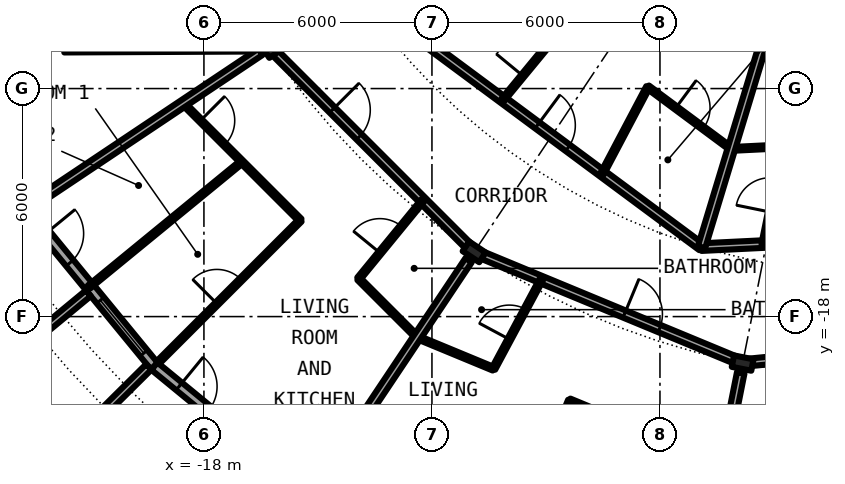
"""IFC4 building model, lengths in metres.
Left out: names, types, materials, properties, quantities, classifications, styles, units other than length and angle.
Written with IfcOpenShell. Run it as: python <this file> out.ifc"""

import sys

from ifc_helpers import new_model, si_unit, direction, frame, frame_2d, origin, origin_2d, place, context, subcontext, project, spatial, rectangle, circle, i_section, extrude, element, fill, save


model = new_model("IFC4")
c1 = context("Model", 3, precision=1e-05, world=origin(), true_north=direction((0.0, 1.0)))
c2 = subcontext(c1, "Body", "Model", "MODEL_VIEW")
j1 = project(units=[si_unit("LENGTHUNIT", "METRE"), si_unit("PLANEANGLEUNIT", "RADIAN")], contexts=[c1])
p1 = place(None, origin())
s1 = spatial("IfcSite", under=j1, at=p1, CompositionType="ELEMENT")
p2 = place(p1, origin())
s2 = spatial("IfcBuilding", under=s1, at=p2, CompositionType="ELEMENT")
p3 = place(p2, frame((0.0, 0.0, 63.6)))
s3 = spatial("IfcBuildingStorey", under=s2, at=p3, CompositionType="ELEMENT", Elevation=63.6)
for number, where, z_axis, x_axis in (
    (1, (-16.297, -10.889, 0.0), (0.0, 0.0, 1.0), (-0.831, -0.556, 0.0)),
    (2, (-10.889, -16.297, 0.0), (0.0, 0.0, 1.0), (-0.556, -0.831, 0.0)),
    (3, (-3.824, -19.223, 0.0), (0.0, 0.0, 1.0), (-0.195, -0.981, 0.0)),
):
    element("IfcColumn", number, at=place(p3, frame(where, z_axis=z_axis, x_axis=x_axis)), inside=s3, PredefinedType="COLUMN", context=c2, shape_type="SweptSolid", body=[
        extrude(i_section(OverallWidth=0.306, OverallDepth=0.524, WebThickness=0.021, FlangeThickness=0.04, FilletRadius=0.027, at=origin_2d()), origin(), (0.0, 0.0, 1.0), 3.05),
    ])
p4 = place(p3, frame((-22.699, -15.167, 0.0), z_axis=(0.0, 0.0, 1.0), x_axis=(0.634382322723, -0.773019449054, 0.0)))
e4 = element("IfcWall", 4, at=p4, inside=s3, PredefinedType="SOLIDWALL", context=c2, shape_type="SweptSolid", body=[
    extrude(rectangle(XDim=5.352, YDim=0.25, at=frame_2d((2.676, 0.0))), origin(), (0.0, 0.0, 1.0), 2.7),
])
p5 = place(p4, frame((0.841, 0.0, 0.0)))
e5 = element("IfcOpeningElement", 5, at=p5, cuts=e4, PredefinedType="OPENING", context=c2, shape_type="SweptSolid", body=[
    extrude(rectangle(XDim=1.0, YDim=2.2, at=frame_2d((0.5, 1.1))), frame((0.0, 0.135, 0.0), z_axis=(0.0, -1.0, 0.0), x_axis=(1.0, 0.0, 0.0)), (0.0, 0.0, 1.0), 0.27),
])
p6 = place(p4, frame((3.111, 0.0, 0.3)))
e6 = element("IfcOpeningElement", 6, at=p6, cuts=e4, PredefinedType="OPENING", context=c2, shape_type="SweptSolid", body=[
    extrude(rectangle(XDim=1.8, YDim=2.1, at=frame_2d((0.9, 1.05))), frame((0.0, 0.135, 0.0), z_axis=(0.0, -1.0, 0.0), x_axis=(1.0, 0.0, 0.0)), (0.0, 0.0, 1.0), 0.27),
])
p7 = place(p3, frame((-23.503, -19.282, -0.03), z_axis=(0.0, 0.0, 1.0), x_axis=(0.671506829416, -0.740998365753, 0.0)))
e7 = element("IfcWall", 7, at=p7, inside=s3, PredefinedType="SOLIDWALL", context=c2, shape_type="SweptSolid", body=[
    extrude(rectangle(XDim=2.993, YDim=0.2, at=frame_2d((1.497, 0.0))), origin(), (0.0, 0.0, 1.0), 2.73),
])
p8 = place(p7, frame((0.457, 0.0, 0.33)))
e8 = element("IfcOpeningElement", 8, at=p8, cuts=e7, PredefinedType="OPENING", context=c2, shape_type="SweptSolid", body=[
    extrude(circle(Radius=1.04, at=frame_2d((1.04, 1.04))), frame((0.0, 0.11, 0.0), z_axis=(0.0, -1.0, 0.0), x_axis=(1.0, 0.0, 0.0)), (0.0, 0.0, 1.0), 0.22),
])
p9 = place(p3, frame((-21.041, -17.384, -0.03), z_axis=(0.0, 0.0, 1.0), x_axis=(-0.770784861449, -0.63709551667, 0.0)))
e9 = element("IfcWall", 9, at=p9, inside=s3, PredefinedType="SOLIDWALL", context=c2, shape_type="SweptSolid", body=[
    extrude(rectangle(XDim=3.006, YDim=0.2, at=frame_2d((1.503, 0.0))), origin(), (0.0, 0.0, 1.0), 2.73),
])
p10 = place(p3, frame((-19.45, -19.323, -0.03), z_axis=(0.0, 0.0, 1.0), x_axis=(-0.709727076896, -0.704476739375, 0.0)))
e10 = element("IfcWall", 10, at=p10, inside=s3, PredefinedType="SOLIDWALL", context=c2, shape_type="SweptSolid", body=[
    extrude(rectangle(XDim=2.883, YDim=0.2, at=frame_2d((1.441, 0.0))), origin(), (0.0, 0.0, 1.0), 2.73),
])
p11 = place(p3, frame((-19.304, -19.304, 0.0), z_axis=(0.0, 0.0, 1.0), x_axis=(0.773019449054, -0.634382322723, 0.0)))
e11 = element("IfcWall", 11, at=p11, inside=s3, PredefinedType="SOLIDWALL", context=c2, shape_type="SweptSolid", body=[
    extrude(rectangle(XDim=5.352, YDim=0.25, at=frame_2d((2.676, 0.0))), origin(), (0.0, 0.0, 1.0), 2.7),
])
p12 = place(p11, frame((0.841, 0.0, 0.0)))
e12 = element("IfcOpeningElement", 12, at=p12, cuts=e11, PredefinedType="OPENING", context=c2, shape_type="SweptSolid", body=[
    extrude(rectangle(XDim=1.0, YDim=2.2, at=frame_2d((0.5, 1.1))), frame((0.0, 0.135, 0.0), z_axis=(0.0, -1.0, 0.0), x_axis=(1.0, 0.0, 0.0)), (0.0, 0.0, 1.0), 0.27),
])
p13 = place(p11, frame((3.111, 0.0, 0.3)))
e13 = element("IfcOpeningElement", 13, at=p13, cuts=e11, PredefinedType="OPENING", context=c2, shape_type="SweptSolid", body=[
    extrude(rectangle(XDim=1.8, YDim=2.1, at=frame_2d((0.9, 1.05))), frame((0.0, 0.135, 0.0), z_axis=(0.0, -1.0, 0.0), x_axis=(1.0, 0.0, 0.0)), (0.0, 0.0, 1.0), 0.27),
])
p14 = place(p3, frame((-18.545, -12.386, 0.0), z_axis=(0.0, 0.0, 1.0), x_axis=(0.707106781187, -0.707106781187, 0.0)))
e14 = element("IfcWall", 14, at=p14, inside=s3, PredefinedType="PARTITIONING", context=c2, shape_type="SweptSolid", body=[
    extrude(rectangle(XDim=4.351, YDim=0.1, at=frame_2d((2.176, 0.0))), origin(), (0.0, 0.0, 1.0), 2.7),
])
p15 = place(p14, frame((0.644, 0.0, 0.0)))
e15 = element("IfcOpeningElement", 15, at=p15, cuts=e14, PredefinedType="OPENING", context=c2, shape_type="SweptSolid", body=[
    extrude(rectangle(XDim=0.9, YDim=2.3, at=frame_2d((0.45, 1.15))), frame((0.0, 0.06, 0.0), z_axis=(0.0, -1.0, 0.0), x_axis=(1.0, 0.0, 0.0)), (0.0, 0.0, 1.0), 0.12),
])
p16 = place(p3, frame((-13.927, -17.004, 0.0), z_axis=(0.0, 0.0, 1.0), x_axis=(0.707106781187, -0.707106781187, 0.0)))
e16 = element("IfcWall", 16, at=p16, inside=s3, PredefinedType="PARTITIONING", context=c2, shape_type="SweptSolid", body=[
    extrude(rectangle(XDim=2.175, YDim=0.1, at=frame_2d((1.088, 0.0))), origin(), (0.0, 0.0, 1.0), 2.7),
])
p17 = place(p3, frame((-12.392, -18.541, 0.0), z_axis=(0.0, 0.0, 1.0), x_axis=(0.923901895183, -0.382629439638, 0.0)))
e17 = element("IfcWall", 17, at=p17, inside=s3, PredefinedType="PARTITIONING", context=c2, shape_type="SweptSolid", body=[
    extrude(rectangle(XDim=2.175, YDim=0.1, at=frame_2d((1.087, 0.0))), origin(), (0.0, 0.0, 1.0), 2.7),
])
p18 = place(p3, frame((-8.376, -20.204, 0.0), z_axis=(0.0, 0.0, 1.0), x_axis=(0.92378218199, -0.382918372814, 0.0)))
e18 = element("IfcWall", 18, at=p18, inside=s3, PredefinedType="PARTITIONING", context=c2, shape_type="SweptSolid", body=[
    extrude(rectangle(XDim=4.364, YDim=0.1, at=frame_2d((2.182, 0.0))), origin(), (0.0, 0.0, 1.0), 2.7),
])
p19 = place(p18, frame((2.823, 0.0, 0.0)))
e19 = element("IfcOpeningElement", 19, at=p19, cuts=e18, PredefinedType="OPENING", context=c2, shape_type="SweptSolid", body=[
    extrude(rectangle(XDim=0.9, YDim=2.3, at=frame_2d((0.45, 1.15))), frame((0.0, 0.06, 0.0), z_axis=(0.0, -1.0, 0.0), x_axis=(1.0, 0.0, 0.0)), (0.0, 0.0, 1.0), 0.12),
])
p20 = place(p3, frame((-16.186, -11.0, 0.0), z_axis=(0.0, 0.0, 1.0), x_axis=(0.707106781187, -0.707106781187, 0.0)))
e20 = element("IfcWall", 20, at=p20, inside=s3, PredefinedType="PARTITIONING", context=c2, shape_type="SweptSolid", body=[
    extrude(rectangle(XDim=7.334, YDim=0.2, at=frame_2d((3.667, 0.0))), origin(), (0.0, 0.0, 1.0), 2.38),
])
p21 = place(p20, frame((2.211, 0.0, 0.0)))
e21 = element("IfcOpeningElement", 21, at=p21, cuts=e20, PredefinedType="OPENING", context=c2, shape_type="SweptSolid", body=[
    extrude(rectangle(XDim=1.0, YDim=2.3, at=frame_2d((0.5, 1.15))), frame((0.0, 0.11, 0.0), z_axis=(0.0, -1.0, 0.0), x_axis=(1.0, 0.0, 0.0)), (0.0, 0.0, 1.0), 0.22),
])
p22 = place(p3, frame((-10.745, -16.356, 0.0), z_axis=(0.0, 0.0, 1.0), x_axis=(0.923881347896, -0.382679049609, 0.0)))
e22 = element("IfcWall", 22, at=p22, inside=s3, PredefinedType="PARTITIONING", context=c2, shape_type="SweptSolid", body=[
    extrude(rectangle(XDim=7.335, YDim=0.2, at=frame_2d((3.668, 0.0))), origin(), (0.0, 0.0, 1.0), 2.38),
])
p23 = place(p22, frame((4.124, 0.0, 0.0)))
e23 = element("IfcOpeningElement", 23, at=p23, cuts=e22, PredefinedType="OPENING", context=c2, shape_type="SweptSolid", body=[
    extrude(rectangle(XDim=1.0, YDim=2.3, at=frame_2d((0.5, 1.15))), frame((0.0, 0.11, 0.0), z_axis=(0.0, -1.0, 0.0), x_axis=(1.0, 0.0, 0.0)), (0.0, 0.0, 1.0), 0.22),
])
p24 = place(p3, frame((-3.665, -19.207, 0.0), z_axis=(0.0, 0.0, 1.0), x_axis=(0.995190249661, 0.097961048277, 0.0)))
e24 = element("IfcWall", 24, at=p24, inside=s3, PredefinedType="PARTITIONING", context=c2, shape_type="SweptSolid", body=[
    extrude(rectangle(XDim=11.22, YDim=0.2, at=frame_2d((5.61, 0.0))), origin(), (0.0, 0.0, 1.0), 2.38),
])
p25 = place(p24, frame((4.08, 0.0, 0.0)))
e25 = element("IfcOpeningElement", 25, at=p25, cuts=e24, PredefinedType="OPENING", context=c2, shape_type="SweptSolid", body=[
    extrude(rectangle(XDim=1.0, YDim=2.3, at=frame_2d((0.5, 1.15))), frame((0.0, 0.11, 0.0), z_axis=(0.0, -1.0, 0.0), x_axis=(1.0, 0.0, 0.0)), (0.0, 0.0, 1.0), 0.22),
])
p26 = place(p3, frame((-12.745, -10.358, 0.0), z_axis=(0.0, 0.0, 1.0), x_axis=(0.803191461888, -0.595720971219, 0.0)))
e26 = element("IfcWall", 26, at=p26, inside=s3, PredefinedType="PARTITIONING", context=c2, shape_type="SweptSolid", body=[
    extrude(rectangle(XDim=9.76, YDim=0.2, at=frame_2d((4.88, 0.0))), origin(), (0.0, 0.0, 1.0), 2.7),
])
p27 = place(p26, frame((4.38, 0.0, 0.0)))
e27 = element("IfcOpeningElement", 27, at=p27, cuts=e26, PredefinedType="OPENING", context=c2, shape_type="SweptSolid", body=[
    extrude(rectangle(XDim=1.0, YDim=2.3, at=frame_2d((0.5, 1.15))), frame((0.0, 0.11, 0.0), z_axis=(0.0, -1.0, 0.0), x_axis=(1.0, 0.0, 0.0)), (0.0, 0.0, 1.0), 0.22),
])
p28 = place(p3, frame((-4.909, -16.172, 0.0), z_axis=(0.0, 0.0, 1.0), x_axis=(0.99879913765, 0.048992679355, 0.0)))
e28 = element("IfcWall", 28, at=p28, inside=s3, PredefinedType="PARTITIONING", context=c2, shape_type="SweptSolid", body=[
    extrude(rectangle(XDim=11.392, YDim=0.2, at=frame_2d((5.696, 0.0))), origin(), (0.0, 0.0, 1.0), 2.7),
])
p29 = place(p28, frame((6.011, 0.0, 0.0)))
e29 = element("IfcOpeningElement", 29, at=p29, cuts=e28, PredefinedType="OPENING", context=c2, shape_type="SweptSolid", body=[
    extrude(rectangle(XDim=1.0, YDim=2.3, at=frame_2d((0.5, 1.15))), frame((0.0, 0.11, 0.0), z_axis=(0.0, -1.0, 0.0), x_axis=(1.0, 0.0, 0.0)), (0.0, 0.0, 1.0), 0.22),
])
p30 = place(p3, frame((-6.319, -11.96, 0.0), z_axis=(0.0, 0.0, 1.0), x_axis=(0.803128348509, -0.595806055542, 0.0)))
e30 = element("IfcWall", 30, at=p30, inside=s3, PredefinedType="PARTITIONING", context=c2, shape_type="SweptSolid", body=[
    extrude(rectangle(XDim=2.734, YDim=0.1, at=frame_2d((1.367, 0.0))), origin(), (0.0, 0.0, 1.0), 2.7),
])
p31 = place(p30, frame((0.918, 0.0, 0.0)))
e31 = element("IfcOpeningElement", 31, at=p31, cuts=e30, PredefinedType="OPENING", context=c2, shape_type="SweptSolid", body=[
    extrude(rectangle(XDim=0.9, YDim=2.3, at=frame_2d((0.45, 1.15))), frame((0.0, 0.06, 0.0), z_axis=(0.0, -1.0, 0.0), x_axis=(1.0, 0.0, 0.0)), (0.0, 0.0, 1.0), 0.12),
])
p32 = place(p3, frame((-4.132, -13.589, 0.0), z_axis=(0.0, 0.0, 1.0), x_axis=(0.998789681748, 0.049185075323, 0.0)))
e32 = element("IfcWall", 32, at=p32, inside=s3, PredefinedType="PARTITIONING", context=c2, shape_type="SweptSolid", body=[
    extrude(rectangle(XDim=4.11, YDim=0.1, at=frame_2d((2.055, 0.0))), origin(), (0.0, 0.0, 1.0), 2.7),
])
p33 = place(p3, frame((-21.675, -10.95, 0.0), z_axis=(0.0, 0.0, 1.0), x_axis=(0.999988019025, 0.004895079807, 0.0)))
e33 = element("IfcWall", 33, at=p33, inside=s3, PredefinedType="PARTITIONING", context=c2, shape_type="SweptSolid", body=[
    extrude(rectangle(XDim=5.087, YDim=0.2, at=frame_2d((2.543, 0.0))), origin(), (0.0, 0.0, 1.0), 2.7),
])
p34 = place(p33, frame((2.163, 0.0, 0.0)))
e34 = element("IfcOpeningElement", 34, at=p34, cuts=e33, PredefinedType="OPENING", context=c2, shape_type="SweptSolid", body=[
    extrude(rectangle(XDim=1.0, YDim=2.3, at=frame_2d((0.5, 1.15))), frame((0.0, 0.11, 0.0), z_axis=(0.0, -1.0, 0.0), x_axis=(1.0, 0.0, 0.0)), (0.0, 0.0, 1.0), 0.22),
])
p35 = place(p3, frame((-22.595, -15.097, 0.0), z_axis=(0.0, 0.0, 1.0), x_axis=(0.831505405283, 0.555516661303, 0.0)))
e35 = element("IfcWall", 35, at=p35, inside=s3, PredefinedType="PARTITIONING", context=c2, shape_type="SweptSolid", body=[
    extrude(rectangle(XDim=7.312, YDim=0.2, at=frame_2d((3.656, 0.0))), origin(), (0.0, 0.0, 1.0), 2.7),
])
p36 = place(p3, frame((-21.023, -17.22, 0.0), z_axis=(0.0, 0.0, 1.0), x_axis=(0.773517471898, 0.633774976367, 0.0)))
e36 = element("IfcWall", 36, at=p36, inside=s3, PredefinedType="PARTITIONING", context=c2, shape_type="SweptSolid", body=[
    extrude(rectangle(XDim=5.196, YDim=0.1, at=frame_2d((2.598, 0.0))), origin(), (0.0, 0.0, 1.0), 2.7),
])
p37 = place(p3, frame((-19.216, -19.216, 0.0), z_axis=(0.0, 0.0, 1.0), x_axis=(0.707106781187, 0.707106781187, 0.0)))
e37 = element("IfcWall", 37, at=p37, inside=s3, PredefinedType="PARTITIONING", context=c2, shape_type="SweptSolid", body=[
    extrude(rectangle(XDim=5.305, YDim=0.1, at=frame_2d((2.652, 0.0))), origin(), (0.0, 0.0, 1.0), 2.7),
])
p38 = place(p37, frame((2.202, 0.0, 0.0)))
e38 = element("IfcOpeningElement", 38, at=p38, cuts=e37, PredefinedType="OPENING", context=c2, shape_type="SweptSolid", body=[
    extrude(rectangle(XDim=0.9, YDim=2.3, at=frame_2d((0.45, 1.15))), frame((0.0, 0.06, 0.0), z_axis=(0.0, -1.0, 0.0), x_axis=(1.0, 0.0, 0.0)), (0.0, 0.0, 1.0), 0.12),
])
p39 = place(p3, frame((-15.098, -22.595, 0.0), z_axis=(0.0, 0.0, 1.0), x_axis=(0.555701298605, 0.831382022135, 0.0)))
e39 = element("IfcWall", 39, at=p39, inside=s3, PredefinedType="PARTITIONING", context=c2, shape_type="SweptSolid", body=[
    extrude(rectangle(XDim=7.313, YDim=0.2, at=frame_2d((3.657, 0.0))), origin(), (0.0, 0.0, 1.0), 2.7),
])
p40 = place(p3, frame((-13.927, -17.004, 0.0), z_axis=(0.0, 0.0, 1.0), x_axis=(0.633582447834, 0.77367517848, 0.0)))
e40 = element("IfcWall", 40, at=p40, inside=s3, PredefinedType="PARTITIONING", context=c2, shape_type="SweptSolid", body=[
    extrude(rectangle(XDim=2.661, YDim=0.1, at=frame_2d((1.331, 0.0))), origin(), (0.0, 0.0, 1.0), 2.7),
])
p41 = place(p40, frame((0.881, 0.0, 0.0)))
e41 = element("IfcOpeningElement", 41, at=p41, cuts=e40, PredefinedType="OPENING", context=c2, shape_type="SweptSolid", body=[
    extrude(rectangle(XDim=0.9, YDim=2.3, at=frame_2d((0.45, 1.15))), frame((0.0, 0.06, 0.0), z_axis=(0.0, -1.0, 0.0), x_axis=(1.0, 0.0, 0.0)), (0.0, 0.0, 1.0), 0.12),
])
p42 = place(p3, frame((-10.399, -25.106, 0.0), z_axis=(0.0, 0.0, 1.0), x_axis=(0.382620183578, 0.92390572848, 0.0)))
e42 = element("IfcWall", 42, at=p42, inside=s3, PredefinedType="PARTITIONING", context=c2, shape_type="SweptSolid", body=[
    extrude(rectangle(XDim=5.302, YDim=0.1, at=frame_2d((2.651, 0.0))), origin(), (0.0, 0.0, 1.0), 2.7),
])
p43 = place(p42, frame((2.201, 0.0, 0.0)))
e43 = element("IfcOpeningElement", 43, at=p43, cuts=e42, PredefinedType="OPENING", context=c2, shape_type="SweptSolid", body=[
    extrude(rectangle(XDim=0.9, YDim=2.3, at=frame_2d((0.45, 1.15))), frame((0.0, 0.06, 0.0), z_axis=(0.0, -1.0, 0.0), x_axis=(1.0, 0.0, 0.0)), (0.0, 0.0, 1.0), 0.12),
])
p44 = place(p3, frame((-10.38, -19.374, 0.0), z_axis=(0.0, 0.0, 1.0), x_axis=(0.472244323015, 0.881467696164, 0.0)))
e44 = element("IfcWall", 44, at=p44, inside=s3, PredefinedType="PARTITIONING", context=c2, shape_type="SweptSolid", body=[
    extrude(rectangle(XDim=2.661, YDim=0.1, at=frame_2d((1.331, 0.0))), origin(), (0.0, 0.0, 1.0), 2.7),
])
p45 = place(p44, frame((0.881, 0.0, 0.0)))
e45 = element("IfcOpeningElement", 45, at=p45, cuts=e44, PredefinedType="OPENING", context=c2, shape_type="SweptSolid", body=[
    extrude(rectangle(XDim=0.9, YDim=2.3, at=frame_2d((0.45, 1.15))), frame((0.0, 0.06, 0.0), z_axis=(0.0, -1.0, 0.0), x_axis=(1.0, 0.0, 0.0)), (0.0, 0.0, 1.0), 0.12),
])
p46 = place(p3, frame((-10.132, -12.296, 0.0), z_axis=(0.0, 0.0, 1.0), x_axis=(0.636105207978, 0.771602335652, 0.0)))
e46 = element("IfcWall", 46, at=p46, inside=s3, PredefinedType="PARTITIONING", context=c2, shape_type="SweptSolid", body=[
    extrude(rectangle(XDim=8.213, YDim=0.1, at=frame_2d((4.106, 0.0))), origin(), (0.0, 0.0, 1.0), 2.7),
])
p47 = place(p46, frame((0.821, 0.0, 0.0)))
e47 = element("IfcOpeningElement", 47, at=p47, cuts=e46, PredefinedType="OPENING", context=c2, shape_type="SweptSolid", body=[
    extrude(rectangle(XDim=0.9, YDim=2.3, at=frame_2d((0.45, 1.15))), frame((0.0, 0.06, 0.0), z_axis=(0.0, -1.0, 0.0), x_axis=(1.0, 0.0, 0.0)), (0.0, 0.0, 1.0), 0.12),
])
p48 = place(p46, frame((4.929, 0.0, 0.0)))
e48 = element("IfcOpeningElement", 48, at=p48, cuts=e46, PredefinedType="OPENING", context=c2, shape_type="SweptSolid", body=[
    extrude(rectangle(XDim=0.9, YDim=2.3, at=frame_2d((0.45, 1.15))), frame((0.0, 0.06, 0.0), z_axis=(0.0, -1.0, 0.0), x_axis=(1.0, 0.0, 0.0)), (0.0, 0.0, 1.0), 0.12),
])
p49 = place(p3, frame((-7.517, -14.235, 0.0), z_axis=(0.0, 0.0, 1.0), x_axis=(0.467037016128, 0.884237765291, 0.0)))
e49 = element("IfcWall", 49, at=p49, inside=s3, PredefinedType="PARTITIONING", context=c2, shape_type="SweptSolid", body=[
    extrude(rectangle(XDim=2.572, YDim=0.1, at=frame_2d((1.286, 0.0))), origin(), (0.0, 0.0, 1.0), 2.7),
])
p50 = place(p3, frame((-5.302, -26.653, 0.0), z_axis=(0.0, 0.0, 1.0), x_axis=(0.195114589291, 0.98078045303, 0.0)))
e50 = element("IfcWall", 50, at=p50, inside=s3, PredefinedType="PARTITIONING", context=c2, shape_type="SweptSolid", body=[
    extrude(rectangle(XDim=7.314, YDim=0.2, at=frame_2d((3.657, 0.0))), origin(), (0.0, 0.0, 1.0), 2.7),
])
p51 = place(p3, frame((-4.906, -16.172, 0.0), z_axis=(0.0, 0.0, 1.0), x_axis=(0.290420725025, 0.956899055531, 0.0)))
e51 = element("IfcWall", 51, at=p51, inside=s3, PredefinedType="PARTITIONING", context=c2, shape_type="SweptSolid", body=[
    extrude(rectangle(XDim=9.18, YDim=0.2, at=frame_2d((4.59, 0.0))), origin(), (0.0, 0.0, 1.0), 2.7),
])
p52 = place(p3, frame((-3.281, -16.092, 0.0), z_axis=(0.0, 0.0, 1.0), x_axis=(0.199675621436, 0.979862054681, 0.0)))
e52 = element("IfcWall", 52, at=p52, inside=s3, PredefinedType="PARTITIONING", context=c2, shape_type="SweptSolid", body=[
    extrude(rectangle(XDim=2.624, YDim=0.1, at=frame_2d((1.312, 0.0))), origin(), (0.0, 0.0, 1.0), 2.7),
])
p53 = place(p52, frame((0.862, 0.0, 0.0)))
e53 = element("IfcOpeningElement", 53, at=p53, cuts=e52, PredefinedType="OPENING", context=c2, shape_type="SweptSolid", body=[
    extrude(rectangle(XDim=0.9, YDim=2.3, at=frame_2d((0.45, 1.15))), frame((0.0, 0.06, 0.0), z_axis=(0.0, -1.0, 0.0), x_axis=(1.0, 0.0, 0.0)), (0.0, 0.0, 1.0), 0.12),
])
p54 = place(p5, origin())
e54 = element("IfcDoor", 54, at=p54, inside=s3, OperationType="SINGLE_SWING_LEFT", PredefinedType="DOOR", context=c2, shape_type="SweptSolid", body=[
    extrude(rectangle(XDim=1.0, YDim=2.2, at=frame_2d((0.5, 1.1))), frame((0.0, 0.025, 0.0), z_axis=(0.0, -1.0, 0.0), x_axis=(1.0, 0.0, 0.0)), (0.0, 0.0, 1.0), 0.05),
])
fill(e5, e54)
p55 = place(p6, origin())
e55 = element("IfcWindow", 55, at=p55, inside=s3, PartitioningType="SINGLE_PANEL", PredefinedType="WINDOW", context=c2, shape_type="SweptSolid", body=[
    extrude(rectangle(XDim=1.8, YDim=2.1, at=frame_2d((0.9, 1.05))), frame((0.0, 0.03, 0.0), z_axis=(0.0, -1.0, 0.0), x_axis=(1.0, 0.0, 0.0)), (0.0, 0.0, 1.0), 0.06),
])
fill(e6, e55)
p56 = place(p8, origin())
e56 = element("IfcWindow", 56, at=p56, inside=s3, PartitioningType="SINGLE_PANEL", PredefinedType="WINDOW", context=c2, shape_type="SweptSolid", body=[
    extrude(circle(Radius=1.04, at=frame_2d((1.04, 1.04))), frame((0.0, 0.03, 0.0), z_axis=(0.0, -1.0, 0.0), x_axis=(1.0, 0.0, 0.0)), (0.0, 0.0, 1.0), 0.06),
])
fill(e8, e56)
p57 = place(p12, origin())
e57 = element("IfcDoor", 57, at=p57, inside=s3, OperationType="SINGLE_SWING_LEFT", PredefinedType="DOOR", context=c2, shape_type="SweptSolid", body=[
    extrude(rectangle(XDim=1.0, YDim=2.2, at=frame_2d((0.5, 1.1))), frame((0.0, 0.025, 0.0), z_axis=(0.0, -1.0, 0.0), x_axis=(1.0, 0.0, 0.0)), (0.0, 0.0, 1.0), 0.05),
])
fill(e12, e57)
p58 = place(p21, origin())
e58 = element("IfcDoor", 58, at=p58, inside=s3, OperationType="SINGLE_SWING_LEFT", PredefinedType="DOOR", context=c2, shape_type="SweptSolid", body=[
    extrude(rectangle(XDim=1.0, YDim=2.3, at=frame_2d((0.5, 1.15))), frame((0.0, 0.025, 0.0), z_axis=(0.0, -1.0, 0.0), x_axis=(1.0, 0.0, 0.0)), (0.0, 0.0, 1.0), 0.05),
])
fill(e21, e58)
p59 = place(p41, origin())
e59 = element("IfcDoor", 59, at=p59, inside=s3, OperationType="SINGLE_SWING_RIGHT", PredefinedType="DOOR", context=c2, shape_type="SweptSolid", body=[
    extrude(rectangle(XDim=0.9, YDim=2.3, at=frame_2d((0.45, 1.15))), frame((0.0, 0.025, 0.0), z_axis=(0.0, -1.0, 0.0), x_axis=(1.0, 0.0, 0.0)), (0.0, 0.0, 1.0), 0.05),
])
fill(e41, e59)
p60 = place(p38, origin())
e60 = element("IfcDoor", 60, at=p60, inside=s3, OperationType="SINGLE_SWING_LEFT", PredefinedType="DOOR", context=c2, shape_type="SweptSolid", body=[
    extrude(rectangle(XDim=0.9, YDim=2.3, at=frame_2d((0.45, 1.15))), frame((0.0, 0.025, 0.0), z_axis=(0.0, -1.0, 0.0), x_axis=(1.0, 0.0, 0.0)), (0.0, 0.0, 1.0), 0.05),
])
fill(e38, e60)
p61 = place(p15, origin())
e61 = element("IfcDoor", 61, at=p61, inside=s3, OperationType="SINGLE_SWING_LEFT", PredefinedType="DOOR", context=c2, shape_type="SweptSolid", body=[
    extrude(rectangle(XDim=0.9, YDim=2.3, at=frame_2d((0.45, 1.15))), frame((0.0, 0.025, 0.0), z_axis=(0.0, -1.0, 0.0), x_axis=(1.0, 0.0, 0.0)), (0.0, 0.0, 1.0), 0.05),
])
fill(e15, e61)
p62 = place(p23, origin())
e62 = element("IfcDoor", 62, at=p62, inside=s3, OperationType="SINGLE_SWING_RIGHT", PredefinedType="DOOR", context=c2, shape_type="SweptSolid", body=[
    extrude(rectangle(XDim=1.0, YDim=2.3, at=frame_2d((0.5, 1.15))), frame((0.0, 0.025, 0.0), z_axis=(0.0, -1.0, 0.0), x_axis=(1.0, 0.0, 0.0)), (0.0, 0.0, 1.0), 0.05),
])
fill(e23, e62)
p63 = place(p45, origin())
e63 = element("IfcDoor", 63, at=p63, inside=s3, OperationType="SINGLE_SWING_RIGHT", PredefinedType="DOOR", context=c2, shape_type="SweptSolid", body=[
    extrude(rectangle(XDim=0.9, YDim=2.3, at=frame_2d((0.45, 1.15))), frame((0.0, 0.025, 0.0), z_axis=(0.0, -1.0, 0.0), x_axis=(1.0, 0.0, 0.0)), (0.0, 0.0, 1.0), 0.05),
])
fill(e45, e63)
p64 = place(p27, origin())
e64 = element("IfcDoor", 64, at=p64, inside=s3, OperationType="SINGLE_SWING_RIGHT", PredefinedType="DOOR", context=c2, shape_type="SweptSolid", body=[
    extrude(rectangle(XDim=1.0, YDim=2.3, at=frame_2d((0.5, 1.15))), frame((0.0, 0.025, 0.0), z_axis=(0.0, -1.0, 0.0), x_axis=(1.0, 0.0, 0.0)), (0.0, 0.0, 1.0), 0.05),
])
fill(e27, e64)
p65 = place(p31, origin())
e65 = element("IfcDoor", 65, at=p65, inside=s3, OperationType="SINGLE_SWING_RIGHT", PredefinedType="DOOR", context=c2, shape_type="SweptSolid", body=[
    extrude(rectangle(XDim=0.9, YDim=2.3, at=frame_2d((0.45, 1.15))), frame((0.0, 0.025, 0.0), z_axis=(0.0, -1.0, 0.0), x_axis=(1.0, 0.0, 0.0)), (0.0, 0.0, 1.0), 0.05),
])
fill(e31, e65)
p66 = place(p47, origin())
e66 = element("IfcDoor", 66, at=p66, inside=s3, OperationType="SINGLE_SWING_LEFT", PredefinedType="DOOR", context=c2, shape_type="SweptSolid", body=[
    extrude(rectangle(XDim=0.9, YDim=2.3, at=frame_2d((0.45, 1.15))), frame((0.0, 0.025, 0.0), z_axis=(0.0, -1.0, 0.0), x_axis=(1.0, 0.0, 0.0)), (0.0, 0.0, 1.0), 0.05),
])
fill(e47, e66)
save(model, sys.argv[1])
